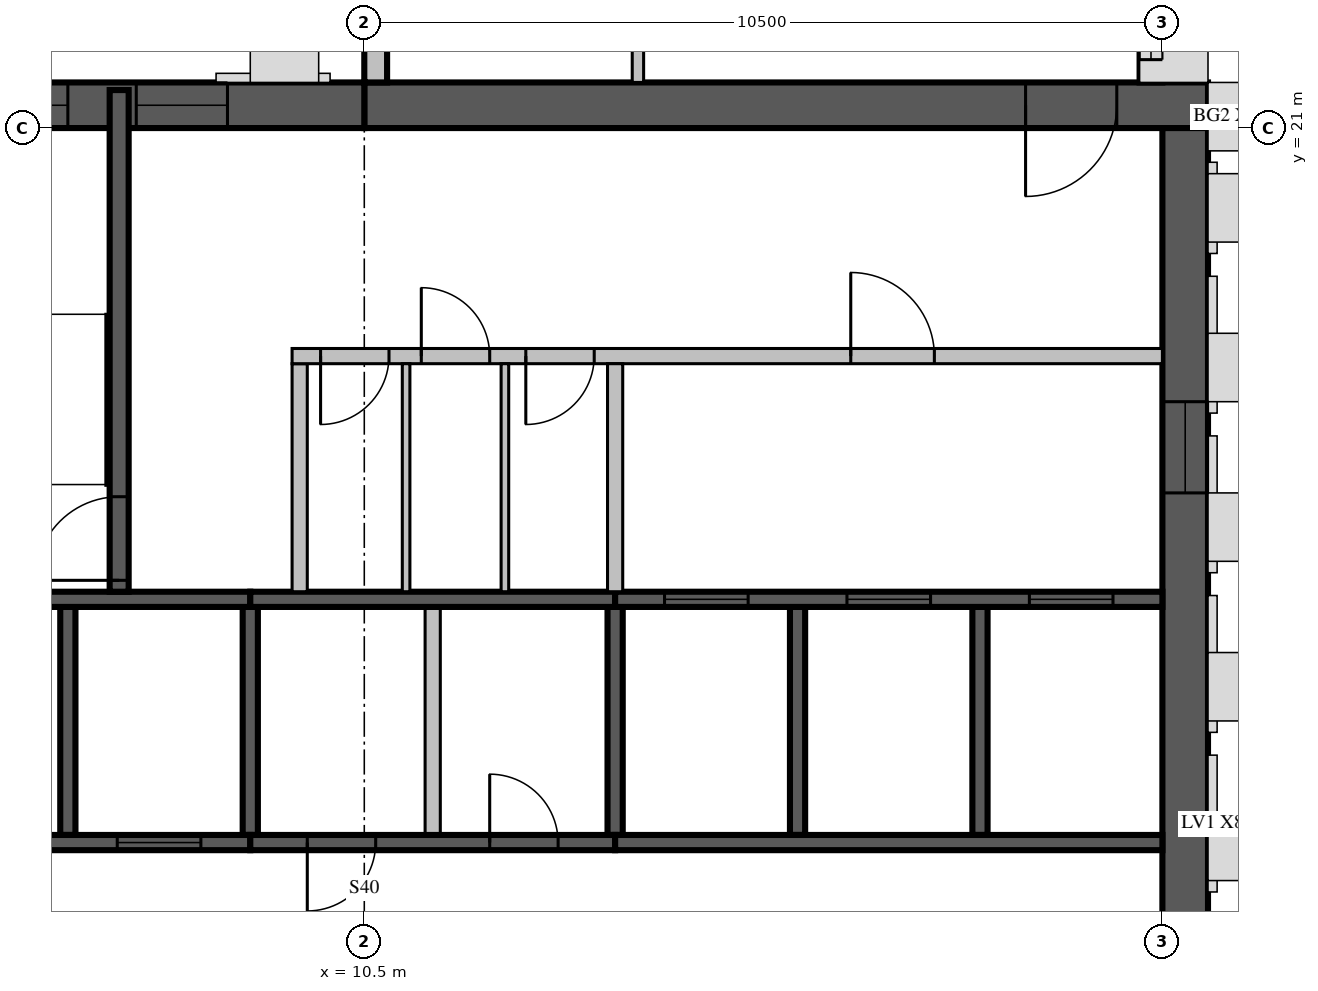
"""IFC4 building model, lengths in metres.
Left out: names, types, materials, properties, quantities, classifications, styles, units other than length and angle.
Written with IfcOpenShell. Run it as: python <this file> out.ifc"""

import sys

from ifc_helpers import new_model, si_unit, direction, frame, frame_2d, origin, place, context, subcontext, project, spatial, rectangle, extrude, source, transform, mapped, element, fill, save


model = new_model("IFC4")
c1 = context("Model", 3, precision=1e-05, world=origin(), true_north=direction((0.0, 1.0)))
c2 = subcontext(c1, "Body", "Model", "MODEL_VIEW")
j1 = project(units=[si_unit("LENGTHUNIT", "METRE"), si_unit("PLANEANGLEUNIT", "RADIAN")], contexts=[c1])
p1 = place(None, origin())
s1 = spatial("IfcSite", under=j1, at=p1, CompositionType="ELEMENT")
p2 = place(p1, origin())
s2 = spatial("IfcBuilding", under=s1, at=p2, CompositionType="ELEMENT")
p3 = place(p2, frame((0.0, 0.0, 361.5)))
s3 = spatial("IfcBuildingStorey", under=s2, at=p3, CompositionType="ELEMENT", Elevation=361.5)
m1 = source(origin(), c2, "Body", "SweptSolid", [
    extrude(rectangle(XDim=11.1, YDim=0.6, at=frame_2d((5.55, 0.0))), origin(), (0.0, 0.0, 1.0), 3.5),
])
p4 = place(p3, frame((10.5, 21.3, 0.0), z_axis=(0.0, 0.0, 1.0), x_axis=(1.0, 0.0, 0.0)))
e1 = element("IfcWall", 1, at=p4, inside=s3, PredefinedType="SHEAR", context=c2, shape_type="MappedRepresentation", body=[
    mapped(m1, transform((0.0, 0.0, 0.0), scale=1.0)),
])
m2 = source(origin(), c2, "Body", "SweptSolid", [
    extrude(rectangle(XDim=1.2, YDim=2.1, at=frame_2d((0.6, 1.05))), frame((0.0, 0.31, 0.0), z_axis=(0.0, -1.0, 0.0), x_axis=(1.0, 0.0, 0.0)), (0.0, 0.0, 1.0), 0.62),
])
p5 = place(p4, frame((8.7, 0.0, 0.0)))
e2 = element("IfcOpeningElement", 2, at=p5, cuts=e1, PredefinedType="OPENING", context=c2, shape_type="MappedRepresentation", body=[
    mapped(m2, transform((0.0, 0.0, 0.0), scale=1.0)),
])
m3 = source(origin(), c2, "Body", "SweptSolid", [
    extrude(rectangle(XDim=10.5, YDim=0.6, at=frame_2d((5.25, 0.0))), origin(), (0.0, 0.0, 1.0), 3.5),
])
p6 = place(p3, frame((21.3, 10.5, 0.0), z_axis=(0.0, 0.0, 1.0), x_axis=(0.0, 1.0, 0.0)))
e3 = element("IfcWall", 3, at=p6, inside=s3, PredefinedType="SHEAR", context=c2, shape_type="MappedRepresentation", body=[
    mapped(m3, transform((0.0, 0.0, 0.0), scale=1.0)),
])
m4 = source(origin(), c2, "Body", "SweptSolid", [
    extrude(rectangle(XDim=1.2, YDim=2.4, at=frame_2d((0.6, 1.2))), frame((0.0, 0.31, 0.0), z_axis=(0.0, -1.0, 0.0), x_axis=(1.0, 0.0, 0.0)), (0.0, 0.0, 1.0), 0.62),
])
p7 = place(p6, frame((5.7, 0.0, 0.6)))
e4 = element("IfcOpeningElement", 4, at=p7, cuts=e3, PredefinedType="OPENING", context=c2, shape_type="MappedRepresentation", body=[
    mapped(m4, transform((0.0, 0.0, 0.0), scale=1.0)),
])
m5 = source(origin(), c2, "Body", "SweptSolid", [
    extrude(rectangle(XDim=6.6, YDim=0.6, at=frame_2d((3.3, 0.0))), origin(), (0.0, 0.0, 1.0), 3.5),
])
p8 = place(p3, frame((3.9, 21.3, 0.0), z_axis=(0.0, 0.0, 1.0), x_axis=(1.0, 0.0, 0.0)))
e5 = element("IfcWall", 5, at=p8, inside=s3, PredefinedType="SHEAR", context=c2, shape_type="MappedRepresentation", body=[
    mapped(m5, transform((0.0, 0.0, 0.0), scale=1.0)),
])
p9 = place(p8, frame((1.5, 0.0, 0.6)))
e6 = element("IfcOpeningElement", 6, at=p9, cuts=e5, PredefinedType="OPENING", context=c2, shape_type="MappedRepresentation", body=[
    mapped(m4, transform((0.0, 0.0, 0.0), scale=1.0)),
])
p10 = place(p8, frame((3.6, 0.0, 0.6)))
e7 = element("IfcOpeningElement", 7, at=p10, cuts=e5, PredefinedType="OPENING", context=c2, shape_type="MappedRepresentation", body=[
    mapped(m4, transform((0.0, 0.0, 0.0), scale=1.0)),
])
m6 = source(origin(), c2, "Body", "SweptSolid", [
    extrude(rectangle(XDim=7.5, YDim=0.3, at=frame_2d((3.75, 0.0))), origin(), (0.0, 0.0, 1.0), 3.1),
])
p11 = place(p3, frame((20.85, 21.6, 0.0), z_axis=(0.0, 0.0, 1.0), x_axis=(0.0, 1.0, 0.0)))
e8 = element("IfcWall", 8, at=p11, inside=s3, PredefinedType="STANDARD", context=c2, shape_type="MappedRepresentation", body=[
    mapped(m6, transform((0.0, 0.0, 0.0), scale=1.0)),
])
m7 = source(origin(), c2, "Body", "SweptSolid", [
    extrude(rectangle(XDim=2.4, YDim=2.0, at=frame_2d((1.2, 1.0))), frame((0.0, 0.16, 0.0), z_axis=(0.0, -1.0, 0.0), x_axis=(1.0, 0.0, 0.0)), (0.0, 0.0, 1.0), 0.32),
])
p12 = place(p11, frame((0.3, 0.0, 0.6)))
e9 = element("IfcOpeningElement", 9, at=p12, cuts=e8, PredefinedType="OPENING", context=c2, shape_type="MappedRepresentation", body=[
    mapped(m7, transform((0.0, 0.0, 0.0), scale=1.0)),
])
m8 = source(origin(), c2, "Body", "SweptSolid", [
    extrude(rectangle(XDim=3.0, YDim=2.0, at=frame_2d((1.5, 1.0))), frame((0.0, 0.16, 0.0), z_axis=(0.0, -1.0, 0.0), x_axis=(1.0, 0.0, 0.0)), (0.0, 0.0, 1.0), 0.32),
])
p13 = place(p11, frame((4.2, 0.0, 0.6)))
e10 = element("IfcOpeningElement", 10, at=p13, cuts=e8, PredefinedType="OPENING", context=c2, shape_type="MappedRepresentation", body=[
    mapped(m8, transform((0.0, 0.0, 0.0), scale=1.0)),
])
m9 = source(origin(), c2, "Body", "SweptSolid", [
    extrude(rectangle(XDim=5.28, YDim=0.3, at=frame_2d((2.64, 0.0))), origin(), (0.0, 0.0, 1.0), 3.1),
])
p14 = place(p3, frame((10.65, 26.88, 0.0), z_axis=(0.0, 0.0, 1.0), x_axis=(0.0, -1.0, 0.0)))
e11 = element("IfcWall", 11, at=p14, inside=s3, PredefinedType="STANDARD", context=c2, shape_type="MappedRepresentation", body=[
    mapped(m9, transform((0.0, 0.0, 0.0), scale=1.0)),
])
m10 = source(origin(), c2, "Body", "SweptSolid", [
    extrude(rectangle(XDim=3.6, YDim=2.0, at=frame_2d((1.8, 1.0))), frame((0.0, 0.16, 0.0), z_axis=(0.0, -1.0, 0.0), x_axis=(1.0, 0.0, 0.0)), (0.0, 0.0, 1.0), 0.32),
])
p15 = place(p14, frame((1.14, 0.0, 0.6)))
e12 = element("IfcOpeningElement", 12, at=p15, cuts=e11, PredefinedType="OPENING", context=c2, shape_type="MappedRepresentation", body=[
    mapped(m10, transform((0.0, 0.0, 0.0), scale=1.0)),
])
m11 = source(origin(), c2, "Body", "SweptSolid", [
    extrude(rectangle(XDim=3.0, YDim=0.2, at=frame_2d((1.5, 0.0))), origin(), (0.0, 0.0, 1.0), 3.5),
])
p16 = place(p3, frame((6.6, 11.7, 0.0), z_axis=(0.0, 0.0, 1.0), x_axis=(0.0, 1.0, 0.0)))
e13 = element("IfcWall", 13, at=p16, inside=s3, PredefinedType="SOLIDWALL", context=c2, shape_type="MappedRepresentation", body=[
    mapped(m11, transform((0.0, 0.0, 0.0), scale=1.0)),
])
m12 = source(origin(), c2, "Body", "SweptSolid", [
    extrude(rectangle(XDim=3.0, YDim=0.2, at=frame_2d((1.5, 0.0))), origin(), (0.0, 0.0, 1.0), 3.1),
])
for number, where, z_axis, x_axis in (
    (14, (9.0, 11.7, 0.0), (0.0, 0.0, 1.0), (0.0, 1.0, 0.0)),
    (15, (13.8, 11.7, 0.0), (0.0, 0.0, 1.0), (0.0, 1.0, 0.0)),
):
    element("IfcWall", number, at=place(p3, frame(where, z_axis=z_axis, x_axis=x_axis)), inside=s3, PredefinedType="SOLIDWALL", context=c2, shape_type="MappedRepresentation", body=[
        mapped(m12, transform((0.0, 0.0, 0.0), scale=1.0)),
    ])
for number, where, z_axis, x_axis in (
    (16, (16.2, 11.7, 0.0), (0.0, 0.0, 1.0), (0.0, 1.0, 0.0)),
    (17, (18.6, 11.7, 0.0), (0.0, 0.0, 1.0), (0.0, 1.0, 0.0)),
):
    element("IfcWall", number, at=place(p3, frame(where, z_axis=z_axis, x_axis=x_axis)), inside=s3, PredefinedType="SOLIDWALL", context=c2, shape_type="MappedRepresentation", body=[
        mapped(m11, transform((0.0, 0.0, 0.0), scale=1.0)),
    ])
m13 = source(origin(), c2, "Body", "SweptSolid", [
    extrude(rectangle(XDim=3.0, YDim=0.2, at=frame_2d((1.5, 0.0))), origin(), (0.0, 0.0, 1.0), 3.1),
])
p17 = place(p3, frame((11.4, 11.7, 0.0), z_axis=(0.0, 0.0, 1.0), x_axis=(0.0, 1.0, 0.0)))
e18 = element("IfcWall", 18, at=p17, inside=s3, PredefinedType="PARTITIONING", context=c2, shape_type="MappedRepresentation", body=[
    mapped(m13, transform((0.0, 0.0, 0.0), scale=1.0)),
])
m14 = source(origin(), c2, "Body", "SweptSolid", [
    extrude(rectangle(XDim=4.8, YDim=0.2, at=frame_2d((2.4, 0.0))), origin(), (0.0, 0.0, 1.0), 3.5),
])
p18 = place(p3, frame((4.2, 11.6, 0.0), z_axis=(0.0, 0.0, 1.0), x_axis=(1.0, 0.0, 0.0)))
e19 = element("IfcWall", 19, at=p18, inside=s3, PredefinedType="SOLIDWALL", context=c2, shape_type="MappedRepresentation", body=[
    mapped(m14, transform((0.0, 0.0, 0.0), scale=1.0)),
])
m15 = source(origin(), c2, "Body", "SweptSolid", [
    extrude(rectangle(XDim=1.1, YDim=2.1, at=frame_2d((0.55, 1.05))), frame((0.0, 0.11, 0.0), z_axis=(0.0, -1.0, 0.0), x_axis=(1.0, 0.0, 0.0)), (0.0, 0.0, 1.0), 0.22),
])
p19 = place(p18, frame((0.65, 0.0, 0.0)))
e20 = element("IfcOpeningElement", 20, at=p19, cuts=e19, PredefinedType="OPENING", context=c2, shape_type="MappedRepresentation", body=[
    mapped(m15, transform((0.0, 0.0, 0.0), scale=1.0)),
])
p20 = place(p18, frame((3.05, 0.0, 0.0)))
e21 = element("IfcOpeningElement", 21, at=p20, cuts=e19, PredefinedType="OPENING", context=c2, shape_type="MappedRepresentation", body=[
    mapped(m15, transform((0.0, 0.0, 0.0), scale=1.0)),
])
m16 = source(origin(), c2, "Body", "SweptSolid", [
    extrude(rectangle(XDim=4.8, YDim=0.2, at=frame_2d((2.4, 0.0))), origin(), (0.0, 0.0, 1.0), 3.1),
])
p21 = place(p3, frame((9.0, 11.6, 0.0), z_axis=(0.0, 0.0, 1.0), x_axis=(1.0, 0.0, 0.0)))
e22 = element("IfcWall", 22, at=p21, inside=s3, PredefinedType="SOLIDWALL", context=c2, shape_type="MappedRepresentation", body=[
    mapped(m16, transform((0.0, 0.0, 0.0), scale=1.0)),
])
m17 = source(origin(), c2, "Body", "SweptSolid", [
    extrude(rectangle(XDim=0.9, YDim=2.1, at=frame_2d((0.45, 1.05))), frame((0.0, 0.11, 0.0), z_axis=(0.0, -1.0, 0.0), x_axis=(1.0, 0.0, 0.0)), (0.0, 0.0, 1.0), 0.22),
])
p22 = place(p21, frame((0.75, 0.0, 0.0)))
e23 = element("IfcOpeningElement", 23, at=p22, cuts=e22, PredefinedType="OPENING", context=c2, shape_type="MappedRepresentation", body=[
    mapped(m17, transform((0.0, 0.0, 0.0), scale=1.0)),
])
p23 = place(p21, frame((3.15, 0.0, 0.0)))
e24 = element("IfcOpeningElement", 24, at=p23, cuts=e22, PredefinedType="OPENING", context=c2, shape_type="MappedRepresentation", body=[
    mapped(m17, transform((0.0, 0.0, 0.0), scale=1.0)),
])
m18 = source(origin(), c2, "Body", "SweptSolid", [
    extrude(rectangle(XDim=7.2, YDim=0.2, at=frame_2d((3.6, 0.0))), origin(), (0.0, 0.0, 1.0), 3.5),
])
p24 = place(p3, frame((13.8, 11.6, 0.0), z_axis=(0.0, 0.0, 1.0), x_axis=(1.0, 0.0, 0.0)))
e25 = element("IfcWall", 25, at=p24, inside=s3, PredefinedType="SOLIDWALL", context=c2, shape_type="MappedRepresentation", body=[
    mapped(m18, transform((0.0, 0.0, 0.0), scale=1.0)),
])
p25 = place(p3, frame((4.2, 14.8, 0.0), z_axis=(0.0, 0.0, 1.0), x_axis=(1.0, 0.0, 0.0)))
e26 = element("IfcWall", 26, at=p25, inside=s3, PredefinedType="SOLIDWALL", context=c2, shape_type="MappedRepresentation", body=[
    mapped(m14, transform((0.0, 0.0, 0.0), scale=1.0)),
])
p26 = place(p3, frame((9.0, 14.8, 0.0), z_axis=(0.0, 0.0, 1.0), x_axis=(1.0, 0.0, 0.0)))
e27 = element("IfcWall", 27, at=p26, inside=s3, PredefinedType="SOLIDWALL", context=c2, shape_type="MappedRepresentation", body=[
    mapped(m16, transform((0.0, 0.0, 0.0), scale=1.0)),
])
p27 = place(p3, frame((13.8, 14.8, 0.0), z_axis=(0.0, 0.0, 1.0), x_axis=(1.0, 0.0, 0.0)))
e28 = element("IfcWall", 28, at=p27, inside=s3, PredefinedType="SOLIDWALL", context=c2, shape_type="MappedRepresentation", body=[
    mapped(m18, transform((0.0, 0.0, 0.0), scale=1.0)),
])
p28 = place(p27, frame((0.65, 0.0, 0.0)))
e29 = element("IfcOpeningElement", 29, at=p28, cuts=e28, PredefinedType="OPENING", context=c2, shape_type="MappedRepresentation", body=[
    mapped(m15, transform((0.0, 0.0, 0.0), scale=1.0)),
])
p29 = place(p27, frame((3.05, 0.0, 0.0)))
e30 = element("IfcOpeningElement", 30, at=p29, cuts=e28, PredefinedType="OPENING", context=c2, shape_type="MappedRepresentation", body=[
    mapped(m15, transform((0.0, 0.0, 0.0), scale=1.0)),
])
p30 = place(p27, frame((5.45, 0.0, 0.0)))
e31 = element("IfcOpeningElement", 31, at=p30, cuts=e28, PredefinedType="OPENING", context=c2, shape_type="MappedRepresentation", body=[
    mapped(m15, transform((0.0, 0.0, 0.0), scale=1.0)),
])
m19 = source(origin(), c2, "Body", "SweptSolid", [
    extrude(rectangle(XDim=6.6, YDim=0.25, at=frame_2d((3.3, 0.0))), origin(), (0.0, 0.0, 1.0), 3.1),
])
p31 = place(p3, frame((7.275, 14.9, 0.0), z_axis=(0.0, 0.0, 1.0), x_axis=(0.0, 1.0, 0.0)))
e32 = element("IfcWall", 32, at=p31, inside=s3, PredefinedType="SOLIDWALL", context=c2, shape_type="MappedRepresentation", body=[
    mapped(m19, transform((0.0, 0.0, 0.0), scale=1.0)),
])
m20 = source(origin(), c2, "Body", "SweptSolid", [
    extrude(rectangle(XDim=1.1, YDim=2.1, at=frame_2d((0.55, 1.05))), frame((0.0, 0.135, 0.0), z_axis=(0.0, -1.0, 0.0), x_axis=(1.0, 0.0, 0.0)), (0.0, 0.0, 1.0), 0.27),
])
p32 = place(p31, frame((0.15, 0.0, 0.0)))
e33 = element("IfcOpeningElement", 33, at=p32, cuts=e32, PredefinedType="OPENING", context=c2, shape_type="MappedRepresentation", body=[
    mapped(m20, transform((0.0, 0.0, 0.0), scale=1.0)),
])
p33 = place(p3, frame((9.65, 14.9, 0.0), z_axis=(0.0, 0.0, 1.0), x_axis=(0.0, 1.0, 0.0)))
e34 = element("IfcWall", 34, at=p33, inside=s3, PredefinedType="PARTITIONING", context=c2, shape_type="MappedRepresentation", body=[
    mapped(m13, transform((0.0, 0.0, 0.0), scale=1.0)),
])
m21 = source(origin(), c2, "Body", "SweptSolid", [
    extrude(rectangle(XDim=11.45, YDim=0.2, at=frame_2d((5.725, 0.0))), origin(), (0.0, 0.0, 1.0), 3.1),
])
p34 = place(p3, frame((9.55, 18.0, 0.0), z_axis=(0.0, 0.0, 1.0), x_axis=(1.0, 0.0, 0.0)))
e35 = element("IfcWall", 35, at=p34, inside=s3, PredefinedType="PARTITIONING", context=c2, shape_type="MappedRepresentation", body=[
    mapped(m21, transform((0.0, 0.0, 0.0), scale=1.0)),
])
p35 = place(p34, frame((0.375, 0.0, 0.0)))
e36 = element("IfcOpeningElement", 36, at=p35, cuts=e35, PredefinedType="OPENING", context=c2, shape_type="MappedRepresentation", body=[
    mapped(m17, transform((0.0, 0.0, 0.0), scale=1.0)),
])
p36 = place(p34, frame((1.7, 0.0, 0.0)))
e37 = element("IfcOpeningElement", 37, at=p36, cuts=e35, PredefinedType="OPENING", context=c2, shape_type="MappedRepresentation", body=[
    mapped(m17, transform((0.0, 0.0, 0.0), scale=1.0)),
])
p37 = place(p34, frame((3.075, 0.0, 0.0)))
e38 = element("IfcOpeningElement", 38, at=p37, cuts=e35, PredefinedType="OPENING", context=c2, shape_type="MappedRepresentation", body=[
    mapped(m17, transform((0.0, 0.0, 0.0), scale=1.0)),
])
p38 = place(p34, frame((7.35, 0.0, 0.0)))
e39 = element("IfcOpeningElement", 39, at=p38, cuts=e35, PredefinedType="OPENING", context=c2, shape_type="MappedRepresentation", body=[
    mapped(m15, transform((0.0, 0.0, 0.0), scale=1.0)),
])
p39 = place(p3, frame((13.8, 14.9, 0.0), z_axis=(0.0, 0.0, 1.0), x_axis=(0.0, 1.0, 0.0)))
e40 = element("IfcWall", 40, at=p39, inside=s3, PredefinedType="PARTITIONING", context=c2, shape_type="MappedRepresentation", body=[
    mapped(m13, transform((0.0, 0.0, 0.0), scale=1.0)),
])
m22 = source(origin(), c2, "Body", "SweptSolid", [
    extrude(rectangle(XDim=3.0, YDim=0.1, at=frame_2d((1.5, 0.0))), origin(), (0.0, 0.0, 1.0), 3.1),
])
for number, where, z_axis, x_axis in (
    (41, (11.05, 14.9, 0.0), (0.0, 0.0, 1.0), (0.0, 1.0, 0.0)),
    (42, (12.35, 14.9, 0.0), (0.0, 0.0, 1.0), (0.0, 1.0, 0.0)),
):
    element("IfcWall", number, at=place(p3, frame(where, z_axis=z_axis, x_axis=x_axis)), inside=s3, PredefinedType="PARTITIONING", context=c2, shape_type="MappedRepresentation", body=[
        mapped(m22, transform((0.0, 0.0, 0.0), scale=1.0)),
    ])
m23 = source(origin(), c2, "Body", "SweptSolid", [
    extrude(rectangle(XDim=7.725, YDim=0.15, at=frame_2d((3.862, 0.0))), origin(), (0.0, 0.0, 1.0), 3.1),
])
p40 = place(p3, frame((14.1, 29.325, 0.0), z_axis=(0.0, 0.0, 1.0), x_axis=(0.0, -1.0, 0.0)))
e43 = element("IfcWall", 43, at=p40, inside=s3, PredefinedType="PARTITIONING", context=c2, shape_type="MappedRepresentation", body=[
    mapped(m23, transform((0.0, 0.0, 0.0), scale=1.0)),
])
m24 = source(origin(), c2, "Body", "SweptSolid", [
    extrude(rectangle(XDim=2.2, YDim=2.1, at=frame_2d((1.1, 1.05))), frame((0.0, 0.085, 0.0), z_axis=(0.0, -1.0, 0.0), x_axis=(1.0, 0.0, 0.0)), (0.0, 0.0, 1.0), 0.17),
])
p41 = place(p40, frame((4.925, 0.0, 0.0)))
e44 = element("IfcOpeningElement", 44, at=p41, cuts=e43, PredefinedType="OPENING", context=c2, shape_type="MappedRepresentation", body=[
    mapped(m24, transform((0.0, 0.0, 0.0), scale=1.0)),
])
m25 = source(origin(), c2, "Body", "SweptSolid", [
    extrude(rectangle(XDim=2.4, YDim=2.0, at=frame_2d((1.2, 1.0))), frame((0.0, 0.03, 0.0), z_axis=(0.0, -1.0, 0.0), x_axis=(1.0, 0.0, 0.0)), (0.0, 0.0, 1.0), 0.06),
])
p42 = place(p12, origin())
e45 = element("IfcWindow", 45, at=p42, inside=s3, PartitioningType="SINGLE_PANEL", PredefinedType="WINDOW", context=c2, shape_type="MappedRepresentation", body=[
    mapped(m25, transform((0.0, 0.0, 0.0), scale=1.0)),
])
fill(e9, e45)
m26 = source(origin(), c2, "Body", "SweptSolid", [
    extrude(rectangle(XDim=1.1, YDim=2.1, at=frame_2d((0.55, 1.05))), frame((0.0, 0.025, 0.0), z_axis=(0.0, -1.0, 0.0), x_axis=(1.0, 0.0, 0.0)), (0.0, 0.0, 1.0), 0.05),
])
p43 = place(p20, origin())
e46 = element("IfcDoor", 46, at=p43, inside=s3, OperationType="SLIDING_TO_LEFT", PredefinedType="DOOR", context=c2, shape_type="MappedRepresentation", body=[
    mapped(m26, transform((0.0, 0.0, 0.0), scale=1.0)),
])
fill(e21, e46)
m27 = source(origin(), c2, "Body", "SweptSolid", [
    extrude(rectangle(XDim=0.9, YDim=2.1, at=frame_2d((0.45, 1.05))), frame((0.0, 0.025, 0.0), z_axis=(0.0, -1.0, 0.0), x_axis=(1.0, 0.0, 0.0)), (0.0, 0.0, 1.0), 0.05),
])
p44 = place(p22, origin())
e47 = element("IfcDoor", 47, at=p44, inside=s3, OperationType="SINGLE_SWING_RIGHT", PredefinedType="DOOR", context=c2, shape_type="MappedRepresentation", body=[
    mapped(m27, transform((0.0, 0.0, 0.0), scale=1.0)),
])
fill(e23, e47)
p45 = place(p23, origin())
e48 = element("IfcDoor", 48, at=p45, inside=s3, OperationType="SINGLE_SWING_LEFT", PredefinedType="DOOR", context=c2, shape_type="MappedRepresentation", body=[
    mapped(m27, transform((0.0, 0.0, 0.0), scale=1.0)),
])
fill(e24, e48)
p46 = place(p28, origin())
e49 = element("IfcDoor", 49, at=p46, inside=s3, OperationType="SLIDING_TO_LEFT", PredefinedType="DOOR", context=c2, shape_type="MappedRepresentation", body=[
    mapped(m26, transform((0.0, 0.0, 0.0), scale=1.0)),
])
fill(e29, e49)
p47 = place(p29, origin())
e50 = element("IfcDoor", 50, at=p47, inside=s3, OperationType="SLIDING_TO_LEFT", PredefinedType="DOOR", context=c2, shape_type="MappedRepresentation", body=[
    mapped(m26, transform((0.0, 0.0, 0.0), scale=1.0)),
])
fill(e30, e50)
p48 = place(p30, origin())
e51 = element("IfcDoor", 51, at=p48, inside=s3, OperationType="SLIDING_TO_LEFT", PredefinedType="DOOR", context=c2, shape_type="MappedRepresentation", body=[
    mapped(m26, transform((0.0, 0.0, 0.0), scale=1.0)),
])
fill(e31, e51)
p49 = place(p32, origin())
e52 = element("IfcDoor", 52, at=p49, inside=s3, OperationType="SINGLE_SWING_LEFT", PredefinedType="DOOR", context=c2, shape_type="MappedRepresentation", body=[
    mapped(m26, transform((0.0, 0.0, 0.0), scale=1.0)),
])
fill(e33, e52)
p50 = place(p35, origin())
e53 = element("IfcDoor", 53, at=p50, inside=s3, OperationType="SINGLE_SWING_RIGHT", PredefinedType="DOOR", context=c2, shape_type="MappedRepresentation", body=[
    mapped(m27, transform((0.0, 0.0, 0.0), scale=1.0)),
])
fill(e36, e53)
p51 = place(p36, origin())
e54 = element("IfcDoor", 54, at=p51, inside=s3, OperationType="SINGLE_SWING_LEFT", PredefinedType="DOOR", context=c2, shape_type="MappedRepresentation", body=[
    mapped(m27, transform((0.0, 0.0, 0.0), scale=1.0)),
])
fill(e37, e54)
p52 = place(p37, origin())
e55 = element("IfcDoor", 55, at=p52, inside=s3, OperationType="SINGLE_SWING_RIGHT", PredefinedType="DOOR", context=c2, shape_type="MappedRepresentation", body=[
    mapped(m27, transform((0.0, 0.0, 0.0), scale=1.0)),
])
fill(e38, e55)
p53 = place(p38, origin())
e56 = element("IfcDoor", 56, at=p53, inside=s3, OperationType="SINGLE_SWING_LEFT", PredefinedType="DOOR", context=c2, shape_type="MappedRepresentation", body=[
    mapped(m26, transform((0.0, 0.0, 0.0), scale=1.0)),
])
fill(e39, e56)
m28 = source(origin(), c2, "Body", "SweptSolid", [
    extrude(rectangle(XDim=1.2, YDim=2.1, at=frame_2d((0.6, 1.05))), frame((0.0, 0.025, 0.0), z_axis=(0.0, -1.0, 0.0), x_axis=(1.0, 0.0, 0.0)), (0.0, 0.0, 1.0), 0.05),
])
p54 = place(p5, origin())
e57 = element("IfcDoor", 57, at=p54, inside=s3, OperationType="SINGLE_SWING_RIGHT", PredefinedType="DOOR", context=c2, shape_type="MappedRepresentation", body=[
    mapped(m28, transform((0.0, 0.0, 0.0), scale=1.0)),
])
fill(e2, e57)
m29 = source(origin(), c2, "Body", "SweptSolid", [
    extrude(rectangle(XDim=1.2, YDim=2.4, at=frame_2d((0.6, 1.2))), frame((0.0, 0.03, 0.0), z_axis=(0.0, -1.0, 0.0), x_axis=(1.0, 0.0, 0.0)), (0.0, 0.0, 1.0), 0.06),
])
p55 = place(p7, origin())
e58 = element("IfcWindow", 58, at=p55, inside=s3, PartitioningType="SINGLE_PANEL", PredefinedType="WINDOW", context=c2, shape_type="MappedRepresentation", body=[
    mapped(m29, transform((0.0, 0.0, 0.0), scale=1.0)),
])
fill(e4, e58)
p56 = place(p9, origin())
e59 = element("IfcWindow", 59, at=p56, inside=s3, PartitioningType="SINGLE_PANEL", PredefinedType="WINDOW", context=c2, shape_type="MappedRepresentation", body=[
    mapped(m29, transform((0.0, 0.0, 0.0), scale=1.0)),
])
fill(e6, e59)
p57 = place(p10, origin())
e60 = element("IfcWindow", 60, at=p57, inside=s3, PartitioningType="SINGLE_PANEL", PredefinedType="WINDOW", context=c2, shape_type="MappedRepresentation", body=[
    mapped(m29, transform((0.0, 0.0, 0.0), scale=1.0)),
])
fill(e7, e60)
save(model, sys.argv[1])
